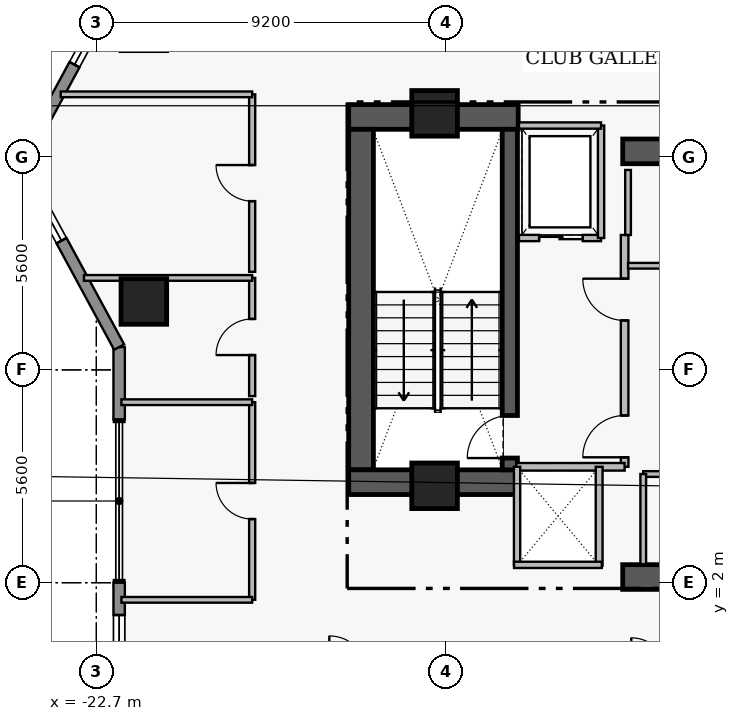
"""IFC4 building model, lengths in metres.
Left out: names, types, materials, properties, quantities, classifications, styles, units other than length and angle.
Written with IfcOpenShell. Run it as: python <this file> out.ifc"""

import sys

from ifc_helpers import new_model, si_unit, direction, frame, frame_2d, origin, origin_2d, place, context, subcontext, project, spatial, rectangle, extrude, element, fill, save


model = new_model("IFC4")
c1 = context("Model", 3, precision=1e-05, world=origin(), true_north=direction((0.0, 1.0)))
c2 = subcontext(c1, "Body", "Model", "MODEL_VIEW")
j1 = project(units=[si_unit("LENGTHUNIT", "METRE"), si_unit("PLANEANGLEUNIT", "RADIAN")], contexts=[c1])
p1 = place(None, origin())
s1 = spatial("IfcSite", under=j1, at=p1, CompositionType="ELEMENT")
p2 = place(p1, origin())
s2 = spatial("IfcBuilding", under=s1, at=p2, CompositionType="ELEMENT")
p3 = place(p2, frame((0.0, 0.0, 192.4)))
s3 = spatial("IfcBuildingStorey", under=s2, at=p3, CompositionType="ELEMENT", Elevation=192.4)
p4 = place(p3, frame((-16.06, 14.255, 0.0), z_axis=(0.0, 0.0, 1.0), x_axis=(1.0, 0.0, 0.0)))
e1 = element("IfcWall", 1, at=p4, inside=s3, PredefinedType="SHEAR", context=c2, shape_type="SweptSolid", body=[
    extrude(rectangle(XDim=4.46, YDim=0.65, at=frame_2d((2.23, 0.0))), origin(), (0.0, 0.0, 1.0), 3.56),
])
p5 = place(p3, frame((-15.735, 4.97, 0.0), z_axis=(0.0, 0.0, 1.0), x_axis=(0.0, 1.0, 0.0)))
e2 = element("IfcWall", 2, at=p5, inside=s3, PredefinedType="SHEAR", context=c2, shape_type="SweptSolid", body=[
    extrude(rectangle(XDim=8.96, YDim=0.65, at=frame_2d((4.48, 0.0))), origin(), (0.0, 0.0, 1.0), 3.56),
])
p6 = place(p3, frame((-16.06, 4.645, 0.0), z_axis=(0.0, 0.0, 1.0), x_axis=(1.0, 0.0, 0.0)))
e3 = element("IfcWall", 3, at=p6, inside=s3, PredefinedType="SHEAR", context=c2, shape_type="SweptSolid", body=[
    extrude(rectangle(XDim=4.46, YDim=0.65, at=frame_2d((2.23, 0.0))), origin(), (0.0, 0.0, 1.0), 3.56),
])
for number, where, z_axis, x_axis in (
    (4, (-8.85, 2.15, 0.0), (0.0, 0.0, 1.0), (1.0, 0.0, 0.0)),
    (5, (-8.85, 13.35, 0.0), (0.0, 0.0, 1.0), (1.0, 0.0, 0.0)),
):
    element("IfcWall", number, at=place(p3, frame(where, z_axis=z_axis, x_axis=x_axis)), inside=s3, PredefinedType="SHEAR", context=c2, shape_type="SweptSolid", body=[
        extrude(rectangle(XDim=7.6, YDim=0.65, at=frame_2d((3.8, 0.0))), origin(), (0.0, 0.0, 1.0), 3.53),
    ])
p7 = place(p3, frame((-11.82, 4.97, 0.0), z_axis=(0.0, 0.0, 1.0), x_axis=(0.0, 1.0, 0.0)))
e6 = element("IfcWall", 6, at=p7, inside=s3, PredefinedType="SHEAR", context=c2, shape_type="SweptSolid", body=[
    extrude(rectangle(XDim=8.96, YDim=0.4, at=frame_2d((4.48, 0.0))), origin(), (0.0, 0.0, 1.0), 3.56),
])
p8 = place(p7, frame((0.31, 0.0, 0.0)))
e7 = element("IfcOpeningElement", 7, at=p8, cuts=e6, PredefinedType="OPENING", context=c2, shape_type="SweptSolid", body=[
    extrude(rectangle(XDim=1.12, YDim=2.22, at=frame_2d((0.56, 1.11))), frame((0.0, 0.21, 0.0), z_axis=(0.0, -1.0, 0.0), x_axis=(1.0, 0.0, 0.0)), (0.0, 0.0, 1.0), 0.42),
])
for number, where, z_axis, x_axis in (
    (8, (-13.8, 14.35, 0.0), (0.0, 0.0, 1.0), (1.0, 0.0, 0.0)),
    (9, (-13.8, 4.55, 0.0), (0.0, 0.0, 1.0), (1.0, 0.0, 0.0)),
    (10, (-21.45, 9.4, 0.0), (0.0, 0.0, 1.0), (1.0, 0.0, 0.0)),
):
    element("IfcColumn", number, at=place(p3, frame(where, z_axis=z_axis, x_axis=x_axis)), inside=s3, PredefinedType="COLUMN", context=c2, shape_type="SweptSolid", body=[
        extrude(rectangle(XDim=1.2, YDim=1.2, at=origin_2d()), origin(), (0.0, 0.0, 1.0), 3.75),
    ])
p9 = place(p3, frame((-22.1, -4.2, 0.0), z_axis=(0.0, 0.0, 1.0), x_axis=(0.0, 1.0, 0.0)))
e11 = element("IfcWall", 11, at=p9, inside=s3, PredefinedType="STANDARD", context=c2, shape_type="SweptSolid", body=[
    extrude(rectangle(XDim=6.2, YDim=0.3, at=frame_2d((3.1, 0.0))), origin(), (0.0, 0.0, 1.0), 3.53),
])
p10 = place(p9, frame((2.045, 0.0, 0.95)))
e12 = element("IfcOpeningElement", 12, at=p10, cuts=e11, PredefinedType="OPENING", context=c2, shape_type="SweptSolid", body=[
    extrude(rectangle(XDim=1.15, YDim=1.55, at=frame_2d((0.575, 0.775))), frame((0.0, 0.16, 0.0), z_axis=(0.0, -1.0, 0.0), x_axis=(1.0, 0.0, 0.0)), (0.0, 0.0, 1.0), 0.32),
])
p11 = place(p9, frame((4.2, 0.0, 0.95)))
e13 = element("IfcOpeningElement", 13, at=p11, cuts=e11, PredefinedType="OPENING", context=c2, shape_type="SweptSolid", body=[
    extrude(rectangle(XDim=1.15, YDim=1.55, at=frame_2d((0.575, 0.775))), frame((0.0, 0.16, 0.0), z_axis=(0.0, -1.0, 0.0), x_axis=(1.0, 0.0, 0.0)), (0.0, 0.0, 1.0), 0.32),
])
p12 = place(p3, frame((-22.1, 6.3, 0.0), z_axis=(0.0, 0.0, 1.0), x_axis=(0.0, 1.0, 0.0)))
e14 = element("IfcWall", 14, at=p12, inside=s3, PredefinedType="STANDARD", context=c2, shape_type="SweptSolid", body=[
    extrude(rectangle(XDim=1.9, YDim=0.3, at=frame_2d((0.95, 0.0))), origin(), (0.0, 0.0, 1.0), 3.53),
])
p13 = place(p3, frame((-22.1, 8.2, 0.0), z_axis=(0.0, 0.0, 1.0), x_axis=(-0.476258655584, 0.879305233114, 0.0)))
e15 = element("IfcWall", 15, at=p13, inside=s3, PredefinedType="STANDARD", context=c2, shape_type="SweptSolid", body=[
    extrude(rectangle(XDim=5.459, YDim=0.3, at=frame_2d((2.729, 0.0))), origin(), (0.0, 0.0, 1.0), 3.53),
])
p14 = place(p13, frame((3.185, 0.0, 1.25)))
e16 = element("IfcOpeningElement", 16, at=p14, cuts=e15, PredefinedType="OPENING", context=c2, shape_type="SweptSolid", body=[
    extrude(rectangle(XDim=1.15, YDim=1.55, at=frame_2d((0.575, 0.775))), frame((0.0, 0.16, 0.0), z_axis=(0.0, -1.0, 0.0), x_axis=(1.0, 0.0, 0.0)), (0.0, 0.0, 1.0), 0.32),
])
p15 = place(p3, frame((-24.7, 13.0, 0.0), z_axis=(0.0, 0.0, 1.0), x_axis=(0.476258655584, 0.879305233114, 0.0)))
e17 = element("IfcWall", 17, at=p15, inside=s3, PredefinedType="STANDARD", context=c2, shape_type="SweptSolid", body=[
    extrude(rectangle(XDim=5.459, YDim=0.3, at=frame_2d((2.729, 0.0))), origin(), (0.0, 0.0, 1.0), 3.53),
])
p16 = place(p15, frame((2.993, 0.0, 1.25)))
e18 = element("IfcOpeningElement", 18, at=p16, cuts=e17, PredefinedType="OPENING", context=c2, shape_type="SweptSolid", body=[
    extrude(rectangle(XDim=1.15, YDim=1.55, at=frame_2d((0.575, 0.775))), frame((0.0, 0.16, 0.0), z_axis=(0.0, -1.0, 0.0), x_axis=(1.0, 0.0, 0.0)), (0.0, 0.0, 1.0), 0.32),
])
p17 = place(p3, frame((-8.8, 5.05, 0.0), z_axis=(0.0, 0.0, 1.0), x_axis=(0.0, 1.0, 0.0)))
e19 = element("IfcWall", 19, at=p17, inside=s3, PredefinedType="PARTITIONING", context=c2, shape_type="SweptSolid", body=[
    extrude(rectangle(XDim=6.1, YDim=0.2, at=frame_2d((3.05, 0.0))), origin(), (0.0, 0.0, 1.0), 3.53),
])
p18 = place(p17, frame((0.25, 0.0, 0.0)))
e20 = element("IfcOpeningElement", 20, at=p18, cuts=e19, PredefinedType="OPENING", context=c2, shape_type="SweptSolid", body=[
    extrude(rectangle(XDim=1.1, YDim=2.2, at=frame_2d((0.55, 1.1))), frame((0.0, 0.11, 0.0), z_axis=(0.0, -1.0, 0.0), x_axis=(1.0, 0.0, 0.0)), (0.0, 0.0, 1.0), 0.22),
])
p19 = place(p17, frame((3.85, 0.0, 0.0)))
e21 = element("IfcOpeningElement", 21, at=p19, cuts=e19, PredefinedType="OPENING", context=c2, shape_type="SweptSolid", body=[
    extrude(rectangle(XDim=1.1, YDim=2.2, at=frame_2d((0.55, 1.1))), frame((0.0, 0.11, 0.0), z_axis=(0.0, -1.0, 0.0), x_axis=(1.0, 0.0, 0.0)), (0.0, 0.0, 1.0), 0.22),
])
p20 = place(p3, frame((-11.58, 11.07, 0.0), z_axis=(0.0, 0.0, 1.0), x_axis=(1.0, 0.0, 0.0)))
e22 = element("IfcWall", 22, at=p20, inside=s3, PredefinedType="PARTITIONING", context=c2, shape_type="SweptSolid", body=[
    extrude(rectangle(XDim=2.16, YDim=0.165, at=frame_2d((1.08, 0.0))), origin(), (0.0, 0.0, 1.0), 3.53),
])
p21 = place(p20, frame((0.53, 0.0, 0.0)))
e23 = element("IfcOpeningElement", 23, at=p21, cuts=e22, PredefinedType="OPENING", context=c2, shape_type="SweptSolid", body=[
    extrude(rectangle(XDim=1.15, YDim=2.25, at=frame_2d((0.575, 1.125))), frame((0.0, 0.093, 0.0), z_axis=(0.0, -1.0, 0.0), x_axis=(1.0, 0.0, 0.0)), (0.0, 0.0, 1.0), 0.185),
])
p22 = place(p3, frame((-8.31, 4.86, 0.0), z_axis=(0.0, 0.0, 1.0), x_axis=(1.0, 0.0, 0.0)))
e24 = element("IfcWall", 24, at=p22, inside=s3, PredefinedType="PARTITIONING", context=c2, shape_type="SweptSolid", body=[
    extrude(rectangle(XDim=4.52, YDim=0.15, at=frame_2d((2.26, 0.0))), origin(), (0.0, 0.0, 1.0), 3.53),
])
p23 = place(p22, frame((1.81, 0.0, 0.0)))
e25 = element("IfcOpeningElement", 25, at=p23, cuts=e24, PredefinedType="OPENING", context=c2, shape_type="SweptSolid", body=[
    extrude(rectangle(XDim=0.9, YDim=2.15, at=frame_2d((0.45, 1.075))), frame((0.0, 0.085, 0.0), z_axis=(0.0, -1.0, 0.0), x_axis=(1.0, 0.0, 0.0)), (0.0, 0.0, 1.0), 0.17),
])
p24 = place(p3, frame((-8.71, 10.34, 0.0), z_axis=(0.0, 0.0, 1.0), x_axis=(1.0, 0.0, 0.0)))
e26 = element("IfcWall", 26, at=p24, inside=s3, PredefinedType="PARTITIONING", context=c2, shape_type="SweptSolid", body=[
    extrude(rectangle(XDim=4.92, YDim=0.15, at=frame_2d((2.46, 0.0))), origin(), (0.0, 0.0, 1.0), 3.53),
])
p25 = place(p24, frame((2.01, 0.0, 0.0)))
e27 = element("IfcOpeningElement", 27, at=p25, cuts=e26, PredefinedType="OPENING", context=c2, shape_type="SweptSolid", body=[
    extrude(rectangle(XDim=0.9, YDim=2.15, at=frame_2d((0.45, 1.075))), frame((0.0, 0.085, 0.0), z_axis=(0.0, -1.0, 0.0), x_axis=(1.0, 0.0, 0.0)), (0.0, 0.0, 1.0), 0.17),
])
p26 = place(p3, frame((-18.6, 1.55, 0.0), z_axis=(0.0, 0.0, 1.0), x_axis=(0.0, 1.0, 0.0)))
e28 = element("IfcWall", 28, at=p26, inside=s3, PredefinedType="PARTITIONING", context=c2, shape_type="SweptSolid", body=[
    extrude(rectangle(XDim=5.2, YDim=0.16, at=frame_2d((2.6, 0.0))), origin(), (0.0, 0.0, 1.0), 3.53),
])
p27 = place(p26, frame((2.125, 0.0, 0.0)))
e29 = element("IfcOpeningElement", 29, at=p27, cuts=e28, PredefinedType="OPENING", context=c2, shape_type="SweptSolid", body=[
    extrude(rectangle(XDim=0.95, YDim=2.15, at=frame_2d((0.475, 1.075))), frame((0.0, 0.09, 0.0), z_axis=(0.0, -1.0, 0.0), x_axis=(1.0, 0.0, 0.0)), (0.0, 0.0, 1.0), 0.18),
])
p28 = place(p3, frame((-18.6, 6.91, 0.0), z_axis=(0.0, 0.0, 1.0), x_axis=(0.0, 1.0, 0.0)))
e30 = element("IfcWall", 30, at=p28, inside=s3, PredefinedType="PARTITIONING", context=c2, shape_type="SweptSolid", body=[
    extrude(rectangle(XDim=3.11, YDim=0.16, at=frame_2d((1.555, 0.0))), origin(), (0.0, 0.0, 1.0), 3.53),
])
p29 = place(p28, frame((1.08, 0.0, 0.0)))
e31 = element("IfcOpeningElement", 31, at=p29, cuts=e30, PredefinedType="OPENING", context=c2, shape_type="SweptSolid", body=[
    extrude(rectangle(XDim=0.95, YDim=2.15, at=frame_2d((0.475, 1.075))), frame((0.0, 0.09, 0.0), z_axis=(0.0, -1.0, 0.0), x_axis=(1.0, 0.0, 0.0)), (0.0, 0.0, 1.0), 0.18),
])
p30 = place(p3, frame((-18.6, 10.18, 0.0), z_axis=(0.0, 0.0, 1.0), x_axis=(0.0, 1.0, 0.0)))
e32 = element("IfcWall", 32, at=p30, inside=s3, PredefinedType="PARTITIONING", context=c2, shape_type="SweptSolid", body=[
    extrude(rectangle(XDim=4.67, YDim=0.16, at=frame_2d((2.335, 0.0))), origin(), (0.0, 0.0, 1.0), 3.53),
])
p31 = place(p30, frame((1.86, 0.0, 0.0)))
e33 = element("IfcOpeningElement", 33, at=p31, cuts=e32, PredefinedType="OPENING", context=c2, shape_type="SweptSolid", body=[
    extrude(rectangle(XDim=0.95, YDim=2.15, at=frame_2d((0.475, 1.075))), frame((0.0, 0.09, 0.0), z_axis=(0.0, -1.0, 0.0), x_axis=(1.0, 0.0, 0.0)), (0.0, 0.0, 1.0), 0.18),
])
p32 = place(p3, frame((-11.65, 5.05, 0.0), z_axis=(0.0, 0.0, 1.0), x_axis=(1.0, 0.0, 0.0)))
e34 = element("IfcWall", 34, at=p32, inside=s3, PredefinedType="PARTITIONING", context=c2, shape_type="SweptSolid", body=[
    extrude(rectangle(XDim=2.85, YDim=0.2, at=frame_2d((1.425, 0.0))), origin(), (0.0, 0.0, 1.0), 3.53),
])
p33 = place(p3, frame((-9.42, 11.07, 0.0), z_axis=(0.0, 0.0, 1.0), x_axis=(0.0, 1.0, 0.0)))
e35 = element("IfcWall", 35, at=p33, inside=s3, PredefinedType="PARTITIONING", context=c2, shape_type="SweptSolid", body=[
    extrude(rectangle(XDim=2.96, YDim=0.165, at=frame_2d((1.48, 0.0))), origin(), (0.0, 0.0, 1.0), 3.53),
])
p34 = place(p3, frame((-11.58, 14.03, 0.0), z_axis=(0.0, 0.0, 1.0), x_axis=(1.0, 0.0, 0.0)))
e36 = element("IfcWall", 36, at=p34, inside=s3, PredefinedType="PARTITIONING", context=c2, shape_type="SweptSolid", body=[
    extrude(rectangle(XDim=2.16, YDim=0.165, at=frame_2d((1.08, 0.0))), origin(), (0.0, 0.0, 1.0), 3.53),
])
p35 = place(p3, frame((-8.31, 2.49, 0.0), z_axis=(0.0, 0.0, 1.0), x_axis=(0.0, 1.0, 0.0)))
e37 = element("IfcWall", 37, at=p35, inside=s3, PredefinedType="PARTITIONING", context=c2, shape_type="SweptSolid", body=[
    extrude(rectangle(XDim=2.37, YDim=0.15, at=frame_2d((1.185, 0.0))), origin(), (0.0, 0.0, 1.0), 3.53),
])
p36 = place(p3, frame((-8.71, 11.15, 0.0), z_axis=(0.0, 0.0, 1.0), x_axis=(0.0, 1.0, 0.0)))
e38 = element("IfcWall", 38, at=p36, inside=s3, PredefinedType="PARTITIONING", context=c2, shape_type="SweptSolid", body=[
    extrude(rectangle(XDim=1.71, YDim=0.15, at=frame_2d((0.855, 0.0))), origin(), (0.0, 0.0, 1.0), 3.53),
])
p37 = place(p3, frame((-9.47, 2.45, 0.0), z_axis=(0.0, 0.0, 1.0), x_axis=(0.0, 1.0, 0.0)))
e39 = element("IfcWall", 39, at=p37, inside=s3, PredefinedType="PARTITIONING", context=c2, shape_type="SweptSolid", body=[
    extrude(rectangle(XDim=2.6, YDim=0.18, at=frame_2d((1.3, 0.0))), origin(), (0.0, 0.0, 1.0), 3.53),
])
p38 = place(p3, frame((-11.63, 2.47, 0.0), z_axis=(0.0, 0.0, 1.0), x_axis=(0.0, 1.0, 0.0)))
e40 = element("IfcWall", 40, at=p38, inside=s3, PredefinedType="PARTITIONING", context=c2, shape_type="SweptSolid", body=[
    extrude(rectangle(XDim=2.58, YDim=0.165, at=frame_2d((1.29, 0.0))), origin(), (0.0, 0.0, 1.0), 3.53),
])
p39 = place(p3, frame((-11.71, 2.47, 0.0), z_axis=(0.0, 0.0, 1.0), x_axis=(1.0, 0.0, 0.0)))
e41 = element("IfcWall", 41, at=p39, inside=s3, PredefinedType="PARTITIONING", context=c2, shape_type="SweptSolid", body=[
    extrude(rectangle(XDim=2.31, YDim=0.165, at=frame_2d((1.155, 0.0))), origin(), (0.0, 0.0, 1.0), 2.43),
])
for number, where, z_axis, x_axis in (
    (42, (-22.04, 1.55, 0.0), (0.0, 0.0, 1.0), (1.0, 0.0, 0.0)),
    (43, (-22.04, 6.75, 0.0), (0.0, 0.0, 1.0), (1.0, 0.0, 0.0)),
):
    element("IfcWall", number, at=place(p3, frame(where, z_axis=z_axis, x_axis=x_axis)), inside=s3, PredefinedType="PARTITIONING", context=c2, shape_type="SweptSolid", body=[
        extrude(rectangle(XDim=3.44, YDim=0.15, at=frame_2d((1.72, 0.0))), origin(), (0.0, 0.0, 1.0), 3.53),
    ])
p40 = place(p3, frame((-23.026, 10.02, 0.0), z_axis=(0.0, 0.0, 1.0), x_axis=(1.0, 0.0, 0.0)))
e44 = element("IfcWall", 44, at=p40, inside=s3, PredefinedType="PARTITIONING", context=c2, shape_type="SweptSolid", body=[
    extrude(rectangle(XDim=4.426, YDim=0.15, at=frame_2d((2.213, 0.0))), origin(), (0.0, 0.0, 1.0), 3.53),
])
p41 = place(p3, frame((-23.638, 14.85, 0.0), z_axis=(0.0, 0.0, 1.0), x_axis=(1.0, 0.0, 0.0)))
e45 = element("IfcWall", 45, at=p41, inside=s3, PredefinedType="PARTITIONING", context=c2, shape_type="SweptSolid", body=[
    extrude(rectangle(XDim=5.038, YDim=0.15, at=frame_2d((2.519, 0.0))), origin(), (0.0, 0.0, 1.0), 3.53),
])
p42 = place(p11, origin())
e46 = element("IfcWindow", 46, at=p42, inside=s3, PartitioningType="SINGLE_PANEL", PredefinedType="WINDOW", context=c2, shape_type="SweptSolid", body=[
    extrude(rectangle(XDim=1.15, YDim=1.55, at=frame_2d((0.575, 0.775))), frame((0.0, 0.03, 0.0), z_axis=(0.0, -1.0, 0.0), x_axis=(1.0, 0.0, 0.0)), (0.0, 0.0, 1.0), 0.06),
])
fill(e13, e46)
p43 = place(p14, origin())
e47 = element("IfcWindow", 47, at=p43, inside=s3, PartitioningType="SINGLE_PANEL", PredefinedType="WINDOW", context=c2, shape_type="SweptSolid", body=[
    extrude(rectangle(XDim=1.15, YDim=1.55, at=frame_2d((0.575, 0.775))), frame((0.0, 0.03, 0.0), z_axis=(0.0, -1.0, 0.0), x_axis=(1.0, 0.0, 0.0)), (0.0, 0.0, 1.0), 0.06),
])
fill(e16, e47)
p44 = place(p16, origin())
e48 = element("IfcWindow", 48, at=p44, inside=s3, PartitioningType="SINGLE_PANEL", PredefinedType="WINDOW", context=c2, shape_type="SweptSolid", body=[
    extrude(rectangle(XDim=1.15, YDim=1.55, at=frame_2d((0.575, 0.775))), frame((0.0, 0.03, 0.0), z_axis=(0.0, -1.0, 0.0), x_axis=(1.0, 0.0, 0.0)), (0.0, 0.0, 1.0), 0.06),
])
fill(e18, e48)
p45 = place(p8, origin())
e49 = element("IfcDoor", 49, at=p45, inside=s3, OperationType="SINGLE_SWING_LEFT", PredefinedType="DOOR", context=c2, shape_type="SweptSolid", body=[
    extrude(rectangle(XDim=1.12, YDim=2.22, at=frame_2d((0.56, 1.11))), frame((0.0, 0.025, 0.0), z_axis=(0.0, -1.0, 0.0), x_axis=(1.0, 0.0, 0.0)), (0.0, 0.0, 1.0), 0.05),
])
fill(e7, e49)
p46 = place(p18, origin())
e50 = element("IfcDoor", 50, at=p46, inside=s3, OperationType="SINGLE_SWING_LEFT", PredefinedType="DOOR", context=c2, shape_type="SweptSolid", body=[
    extrude(rectangle(XDim=1.1, YDim=2.2, at=frame_2d((0.55, 1.1))), frame((0.0, 0.025, 0.0), z_axis=(0.0, -1.0, 0.0), x_axis=(1.0, 0.0, 0.0)), (0.0, 0.0, 1.0), 0.05),
])
fill(e20, e50)
p47 = place(p19, origin())
e51 = element("IfcDoor", 51, at=p47, inside=s3, OperationType="SINGLE_SWING_RIGHT", PredefinedType="DOOR", context=c2, shape_type="SweptSolid", body=[
    extrude(rectangle(XDim=1.1, YDim=2.2, at=frame_2d((0.55, 1.1))), frame((0.0, 0.025, 0.0), z_axis=(0.0, -1.0, 0.0), x_axis=(1.0, 0.0, 0.0)), (0.0, 0.0, 1.0), 0.05),
])
fill(e21, e51)
p48 = place(p21, origin())
e52 = element("IfcDoor", 52, at=p48, inside=s3, OperationType="SLIDING_TO_LEFT", PredefinedType="DOOR", context=c2, shape_type="SweptSolid", body=[
    extrude(rectangle(XDim=1.15, YDim=2.25, at=frame_2d((0.575, 1.125))), frame((0.0, 0.025, 0.0), z_axis=(0.0, -1.0, 0.0), x_axis=(1.0, 0.0, 0.0)), (0.0, 0.0, 1.0), 0.05),
])
fill(e23, e52)
p49 = place(p27, origin())
e53 = element("IfcDoor", 53, at=p49, inside=s3, OperationType="SINGLE_SWING_RIGHT", PredefinedType="DOOR", context=c2, shape_type="SweptSolid", body=[
    extrude(rectangle(XDim=0.95, YDim=2.15, at=frame_2d((0.475, 1.075))), frame((0.0, 0.025, 0.0), z_axis=(0.0, -1.0, 0.0), x_axis=(1.0, 0.0, 0.0)), (0.0, 0.0, 1.0), 0.05),
])
fill(e29, e53)
p50 = place(p29, origin())
e54 = element("IfcDoor", 54, at=p50, inside=s3, OperationType="SINGLE_SWING_LEFT", PredefinedType="DOOR", context=c2, shape_type="SweptSolid", body=[
    extrude(rectangle(XDim=0.95, YDim=2.15, at=frame_2d((0.475, 1.075))), frame((0.0, 0.025, 0.0), z_axis=(0.0, -1.0, 0.0), x_axis=(1.0, 0.0, 0.0)), (0.0, 0.0, 1.0), 0.05),
])
fill(e31, e54)
p51 = place(p31, origin())
e55 = element("IfcDoor", 55, at=p51, inside=s3, OperationType="SINGLE_SWING_RIGHT", PredefinedType="DOOR", context=c2, shape_type="SweptSolid", body=[
    extrude(rectangle(XDim=0.95, YDim=2.15, at=frame_2d((0.475, 1.075))), frame((0.0, 0.025, 0.0), z_axis=(0.0, -1.0, 0.0), x_axis=(1.0, 0.0, 0.0)), (0.0, 0.0, 1.0), 0.05),
])
fill(e33, e55)
save(model, sys.argv[1])
